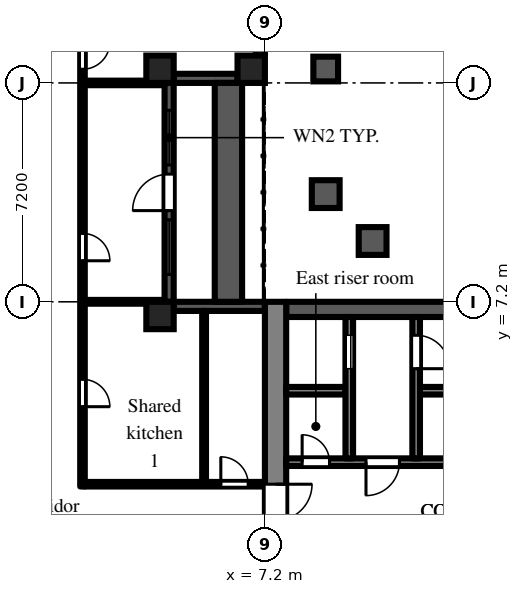
"""IFC4 building model, lengths in metres.
Left out: names, types, materials, properties, quantities, classifications, styles, units other than length and angle.
Written with IfcOpenShell. Run it as: python <this file> out.ifc"""

import sys

from ifc_helpers import new_model, si_unit, direction, frame, frame_2d, origin, origin_2d, place, context, subcontext, project, spatial, rectangle, extrude, element, fill, save


model = new_model("IFC4")
c1 = context("Model", 3, precision=1e-05, world=origin(), true_north=direction((0.0, 1.0)))
c2 = subcontext(c1, "Body", "Model", "MODEL_VIEW")
j1 = project(units=[si_unit("LENGTHUNIT", "METRE"), si_unit("PLANEANGLEUNIT", "RADIAN")], contexts=[c1])
p1 = place(None, origin())
s1 = spatial("IfcSite", under=j1, at=p1, CompositionType="ELEMENT")
p2 = place(p1, origin())
s2 = spatial("IfcBuilding", under=s1, at=p2, CompositionType="ELEMENT")
p3 = place(p2, frame((0.0, 0.0, 59.7)))
s3 = spatial("IfcBuildingStorey", under=s2, at=p3, CompositionType="ELEMENT", Elevation=59.7)
for number, where, z_axis, x_axis in (
    (1, (3.75, 6.75, 0.0), (0.0, 0.0, 1.0), (1.0, 0.0, 0.0)),
    (2, (3.75, 14.85, 0.0), (0.0, 0.0, 1.0), (1.0, 0.0, 0.0)),
    (3, (6.75, 14.85, 0.0), (0.0, 0.0, 1.0), (1.0, 0.0, 0.0)),
):
    element("IfcColumn", number, at=place(p3, frame(where, z_axis=z_axis, x_axis=x_axis)), inside=s3, PredefinedType="COLUMN", context=c2, shape_type="SweptSolid", body=[
        extrude(rectangle(XDim=0.9, YDim=0.9, at=origin_2d()), origin(), (0.0, 0.0, 1.0), 3.0),
    ])
p4 = place(p3, frame((7.2, 7.05, 0.0), z_axis=(0.0, 0.0, 1.0), x_axis=(-1.0, 0.0, 0.0)))
e4 = element("IfcWall", 4, at=p4, inside=s3, PredefinedType="SOLIDWALL", context=c2, shape_type="SweptSolid", body=[
    extrude(rectangle(XDim=3.0, YDim=0.3, at=frame_2d((1.5, 0.0))), origin(), (0.0, 0.0, 1.0), 2.55),
])
p5 = place(p3, frame((4.05, 7.2, 0.0), z_axis=(0.0, 0.0, 1.0), x_axis=(0.0, 1.0, 0.0)))
e5 = element("IfcWall", 5, at=p5, inside=s3, PredefinedType="SOLIDWALL", context=c2, shape_type="SweptSolid", body=[
    extrude(rectangle(XDim=7.2, YDim=0.3, at=frame_2d((3.6, 0.0))), origin(), (0.0, 0.0, 1.0), 2.55),
])
p6 = place(p5, frame((3.0, 0.0, 0.0)))
e6 = element("IfcOpeningElement", 6, at=p6, cuts=e5, PredefinedType="OPENING", context=c2, shape_type="SweptSolid", body=[
    extrude(rectangle(XDim=1.2, YDim=2.05, at=frame_2d((0.6, 1.025))), frame((0.0, 0.16, 0.0), z_axis=(0.0, -1.0, 0.0), x_axis=(1.0, 0.0, 0.0)), (0.0, 0.0, 1.0), 0.32),
])
p7 = place(p5, frame((0.9, 0.0, 0.2)))
e7 = element("IfcOpeningElement", 7, at=p7, cuts=e5, PredefinedType="OPENING", context=c2, shape_type="SweptSolid", body=[
    extrude(rectangle(XDim=1.8, YDim=1.85, at=frame_2d((0.9, 0.925))), frame((0.0, 0.16, 0.0), z_axis=(0.0, -1.0, 0.0), x_axis=(1.0, 0.0, 0.0)), (0.0, 0.0, 1.0), 0.32),
])
p8 = place(p5, frame((4.5, 0.0, 0.2)))
e8 = element("IfcOpeningElement", 8, at=p8, cuts=e5, PredefinedType="OPENING", context=c2, shape_type="SweptSolid", body=[
    extrude(rectangle(XDim=1.8, YDim=1.85, at=frame_2d((0.9, 0.925))), frame((0.0, 0.16, 0.0), z_axis=(0.0, -1.0, 0.0), x_axis=(1.0, 0.0, 0.0)), (0.0, 0.0, 1.0), 0.32),
])
p9 = place(p3, frame((4.2, 14.55, 0.0), z_axis=(0.0, 0.0, 1.0), x_axis=(1.0, 0.0, 0.0)))
e9 = element("IfcWall", 9, at=p9, inside=s3, PredefinedType="SOLIDWALL", context=c2, shape_type="SweptSolid", body=[
    extrude(rectangle(XDim=2.1, YDim=0.3, at=frame_2d((1.05, 0.0))), origin(), (0.0, 0.0, 1.0), 2.55),
])
p10 = place(p3, frame((7.05, 15.3, 0.0), z_axis=(0.0, 0.0, 1.0), x_axis=(0.0, 1.0, 0.0)))
e10 = element("IfcWall", 10, at=p10, inside=s3, PredefinedType="SOLIDWALL", context=c2, shape_type="SweptSolid", body=[
    extrude(rectangle(XDim=1.8, YDim=0.3, at=frame_2d((0.9, 0.0))), origin(), (0.0, 0.0, 1.0), 2.1),
])
p11 = place(p3, frame((6.0, 7.2, 0.0), z_axis=(0.0, 0.0, 1.0), x_axis=(0.0, 1.0, 0.0)))
e11 = element("IfcWall", 11, at=p11, inside=s3, PredefinedType="PARAPET", context=c2, shape_type="SweptSolid", body=[
    extrude(rectangle(XDim=7.2, YDim=0.9, at=frame_2d((3.6, 0.0))), origin(), (0.0, 0.0, 1.0), 0.8),
])
p12 = place(p3, frame((7.55, -7.2, 0.0), z_axis=(0.0, 0.0, 1.0), x_axis=(0.0, 1.0, 0.0)))
e12 = element("IfcWall", 12, at=p12, inside=s3, PredefinedType="SHEAR", context=c2, shape_type="SweptSolid", body=[
    extrude(rectangle(XDim=14.4, YDim=0.7, at=frame_2d((7.2, 0.0))), origin(), (0.0, 0.0, 1.0), 2.55),
])
p13 = place(p12, frame((6.0, 0.0, 0.0)))
e13 = element("IfcOpeningElement", 13, at=p13, cuts=e12, PredefinedType="OPENING", context=c2, shape_type="SweptSolid", body=[
    extrude(rectangle(XDim=2.4, YDim=2.2, at=frame_2d((1.2, 1.1))), frame((0.0, 0.36, 0.0), z_axis=(0.0, -1.0, 0.0), x_axis=(1.0, 0.0, 0.0)), (0.0, 0.0, 1.0), 0.72),
])
p14 = place(p3, frame((7.9, 6.95, 0.0), z_axis=(0.0, 0.0, 1.0), x_axis=(1.0, 0.0, 0.0)))
e14 = element("IfcWall", 14, at=p14, inside=s3, PredefinedType="SHEAR", context=c2, shape_type="SweptSolid", body=[
    extrude(rectangle(XDim=12.95, YDim=0.5, at=frame_2d((6.475, 0.0))), origin(), (0.0, 0.0, 1.0), 2.55),
])
p15 = place(p3, frame((7.9, 1.925, 0.0), z_axis=(0.0, 0.0, 1.0), x_axis=(1.0, 0.0, 0.0)))
e15 = element("IfcWall", 15, at=p15, inside=s3, PredefinedType="SHEAR", context=c2, shape_type="SweptSolid", body=[
    extrude(rectangle(XDim=12.95, YDim=0.25, at=frame_2d((6.475, 0.0))), origin(), (0.0, 0.0, 1.0), 2.55),
])
p16 = place(p15, frame((0.525, 0.0, 0.0)))
e16 = element("IfcOpeningElement", 16, at=p16, cuts=e15, PredefinedType="OPENING", context=c2, shape_type="SweptSolid", body=[
    extrude(rectangle(XDim=0.9, YDim=2.1, at=frame_2d((0.45, 1.05))), frame((0.0, 0.135, 0.0), z_axis=(0.0, -1.0, 0.0), x_axis=(1.0, 0.0, 0.0)), (0.0, 0.0, 1.0), 0.27),
])
p17 = place(p15, frame((2.625, 0.0, 0.0)))
e17 = element("IfcOpeningElement", 17, at=p17, cuts=e15, PredefinedType="OPENING", context=c2, shape_type="SweptSolid", body=[
    extrude(rectangle(XDim=1.1, YDim=2.1, at=frame_2d((0.55, 1.05))), frame((0.0, 0.135, 0.0), z_axis=(0.0, -1.0, 0.0), x_axis=(1.0, 0.0, 0.0)), (0.0, 0.0, 1.0), 0.27),
])
p18 = place(p15, frame((6.025, 0.0, 0.0)))
e18 = element("IfcOpeningElement", 18, at=p18, cuts=e15, PredefinedType="OPENING", context=c2, shape_type="SweptSolid", body=[
    extrude(rectangle(XDim=0.9, YDim=2.1, at=frame_2d((0.45, 1.05))), frame((0.0, 0.135, 0.0), z_axis=(0.0, -1.0, 0.0), x_axis=(1.0, 0.0, 0.0)), (0.0, 0.0, 1.0), 0.27),
])
p19 = place(p15, frame((9.325, 0.0, 0.0)))
e19 = element("IfcOpeningElement", 19, at=p19, cuts=e15, PredefinedType="OPENING", context=c2, shape_type="SweptSolid", body=[
    extrude(rectangle(XDim=0.9, YDim=2.1, at=frame_2d((0.45, 1.05))), frame((0.0, 0.135, 0.0), z_axis=(0.0, -1.0, 0.0), x_axis=(1.0, 0.0, 0.0)), (0.0, 0.0, 1.0), 0.27),
])
p20 = place(p3, frame((7.9, 4.275, 0.0), z_axis=(0.0, 0.0, 1.0), x_axis=(1.0, 0.0, 0.0)))
e20 = element("IfcWall", 20, at=p20, inside=s3, PredefinedType="SHEAR", context=c2, shape_type="SweptSolid", body=[
    extrude(rectangle(XDim=1.95, YDim=0.25, at=frame_2d((0.975, 0.0))), origin(), (0.0, 0.0, 1.0), 2.55),
])
p21 = place(p3, frame((12.3, 4.275, 0.0), z_axis=(0.0, 0.0, 1.0), x_axis=(1.0, 0.0, 0.0)))
e21 = element("IfcWall", 21, at=p21, inside=s3, PredefinedType="SHEAR", context=c2, shape_type="SweptSolid", body=[
    extrude(rectangle(XDim=8.55, YDim=0.25, at=frame_2d((4.275, 0.0))), origin(), (0.0, 0.0, 1.0), 2.55),
])
p22 = place(p3, frame((9.975, 2.05, 0.0), z_axis=(0.0, 0.0, 1.0), x_axis=(0.0, 1.0, 0.0)))
e22 = element("IfcWall", 22, at=p22, inside=s3, PredefinedType="SHEAR", context=c2, shape_type="SweptSolid", body=[
    extrude(rectangle(XDim=4.65, YDim=0.25, at=frame_2d((2.325, 0.0))), origin(), (0.0, 0.0, 1.0), 2.55),
])
p23 = place(p22, frame((2.95, 0.0, 0.0)))
e23 = element("IfcOpeningElement", 23, at=p23, cuts=e22, PredefinedType="OPENING", context=c2, shape_type="SweptSolid", body=[
    extrude(rectangle(XDim=1.1, YDim=2.1, at=frame_2d((0.55, 1.05))), frame((0.0, 0.135, 0.0), z_axis=(0.0, -1.0, 0.0), x_axis=(1.0, 0.0, 0.0)), (0.0, 0.0, 1.0), 0.27),
])
p24 = place(p3, frame((12.175, 2.05, 0.0), z_axis=(0.0, 0.0, 1.0), x_axis=(0.0, 1.0, 0.0)))
e24 = element("IfcWall", 24, at=p24, inside=s3, PredefinedType="SHEAR", context=c2, shape_type="SweptSolid", body=[
    extrude(rectangle(XDim=4.65, YDim=0.25, at=frame_2d((2.325, 0.0))), origin(), (0.0, 0.0, 1.0), 2.55),
])
p25 = place(p24, frame((2.95, 0.0, 0.0)))
e25 = element("IfcOpeningElement", 25, at=p25, cuts=e24, PredefinedType="OPENING", context=c2, shape_type="SweptSolid", body=[
    extrude(rectangle(XDim=1.1, YDim=2.1, at=frame_2d((0.55, 1.05))), frame((0.0, 0.135, 0.0), z_axis=(0.0, -1.0, 0.0), x_axis=(1.0, 0.0, 0.0)), (0.0, 0.0, 1.0), 0.27),
])
p26 = place(p3, frame((1.2, 1.125, 0.0), z_axis=(0.0, 0.0, 1.0), x_axis=(0.0, 1.0, 0.0)))
e26 = element("IfcWall", 26, at=p26, inside=s3, PredefinedType="PARTITIONING", context=c2, shape_type="SweptSolid", body=[
    extrude(rectangle(XDim=35.375, YDim=0.15, at=frame_2d((17.688, 0.0))), origin(), (0.0, 0.0, 1.0), 2.55),
])
p27 = place(p26, frame((2.625, 0.0, 0.0)))
e27 = element("IfcOpeningElement", 27, at=p27, cuts=e26, PredefinedType="OPENING", context=c2, shape_type="SweptSolid", body=[
    extrude(rectangle(XDim=0.9, YDim=2.1, at=frame_2d((0.45, 1.05))), frame((0.0, 0.085, 0.0), z_axis=(0.0, -1.0, 0.0), x_axis=(1.0, 0.0, 0.0)), (0.0, 0.0, 1.0), 0.17),
])
p28 = place(p26, frame((7.425, 0.0, 0.0)))
e28 = element("IfcOpeningElement", 28, at=p28, cuts=e26, PredefinedType="OPENING", context=c2, shape_type="SweptSolid", body=[
    extrude(rectangle(XDim=0.9, YDim=2.1, at=frame_2d((0.45, 1.05))), frame((0.0, 0.085, 0.0), z_axis=(0.0, -1.0, 0.0), x_axis=(1.0, 0.0, 0.0)), (0.0, 0.0, 1.0), 0.17),
])
p29 = place(p26, frame((13.725, 0.0, 0.0)))
e29 = element("IfcOpeningElement", 29, at=p29, cuts=e26, PredefinedType="OPENING", context=c2, shape_type="SweptSolid", body=[
    extrude(rectangle(XDim=0.9, YDim=2.1, at=frame_2d((0.45, 1.05))), frame((0.0, 0.085, 0.0), z_axis=(0.0, -1.0, 0.0), x_axis=(1.0, 0.0, 0.0)), (0.0, 0.0, 1.0), 0.17),
])
p30 = place(p26, frame((15.525, 0.0, 0.0)))
e30 = element("IfcOpeningElement", 30, at=p30, cuts=e26, PredefinedType="OPENING", context=c2, shape_type="SweptSolid", body=[
    extrude(rectangle(XDim=0.9, YDim=2.1, at=frame_2d((0.45, 1.05))), frame((0.0, 0.085, 0.0), z_axis=(0.0, -1.0, 0.0), x_axis=(1.0, 0.0, 0.0)), (0.0, 0.0, 1.0), 0.17),
])
p31 = place(p26, frame((32.825, 0.0, 0.0)))
e31 = element("IfcOpeningElement", 31, at=p31, cuts=e26, PredefinedType="OPENING", context=c2, shape_type="SweptSolid", body=[
    extrude(rectangle(XDim=1.0, YDim=2.1, at=frame_2d((0.5, 1.05))), frame((0.0, 0.085, 0.0), z_axis=(0.0, -1.0, 0.0), x_axis=(1.0, 0.0, 0.0)), (0.0, 0.0, 1.0), 0.17),
])
p32 = place(p3, frame((1.275, 1.2, 0.0), z_axis=(0.0, 0.0, 1.0), x_axis=(1.0, 0.0, 0.0)))
e32 = element("IfcWall", 32, at=p32, inside=s3, PredefinedType="PARTITIONING", context=c2, shape_type="SweptSolid", body=[
    extrude(rectangle(XDim=5.925, YDim=0.15, at=frame_2d((2.962, 0.0))), origin(), (0.0, 0.0, 1.0), 2.55),
])
p33 = place(p32, frame((4.475, 0.0, 0.0)))
e33 = element("IfcOpeningElement", 33, at=p33, cuts=e32, PredefinedType="OPENING", context=c2, shape_type="SweptSolid", body=[
    extrude(rectangle(XDim=0.9, YDim=2.1, at=frame_2d((0.45, 1.05))), frame((0.0, 0.085, 0.0), z_axis=(0.0, -1.0, 0.0), x_axis=(1.0, 0.0, 0.0)), (0.0, 0.0, 1.0), 0.17),
])
p34 = place(p3, frame((1.275, 7.2, 0.0), z_axis=(0.0, 0.0, 1.0), x_axis=(1.0, 0.0, 0.0)))
e34 = element("IfcWall", 34, at=p34, inside=s3, PredefinedType="PARTITIONING", context=c2, shape_type="SweptSolid", body=[
    extrude(rectangle(XDim=2.625, YDim=0.125, at=frame_2d((1.312, 0.0))), origin(), (0.0, 0.0, 1.0), 2.55),
])
p35 = place(p3, frame((1.275, 14.4, 0.0), z_axis=(0.0, 0.0, 1.0), x_axis=(1.0, 0.0, 0.0)))
e35 = element("IfcWall", 35, at=p35, inside=s3, PredefinedType="PARTITIONING", context=c2, shape_type="SweptSolid", body=[
    extrude(rectangle(XDim=2.625, YDim=0.15, at=frame_2d((1.312, 0.0))), origin(), (0.0, 0.0, 1.0), 2.55),
])
p36 = place(p3, frame((5.2, 1.275, 0.0), z_axis=(0.0, 0.0, 1.0), x_axis=(0.0, 1.0, 0.0)))
e36 = element("IfcWall", 36, at=p36, inside=s3, PredefinedType="PARTITIONING", context=c2, shape_type="SweptSolid", body=[
    extrude(rectangle(XDim=5.625, YDim=0.125, at=frame_2d((2.812, 0.0))), origin(), (0.0, 0.0, 1.0), 2.55),
])
p37 = place(p6, origin())
e37 = element("IfcDoor", 37, at=p37, inside=s3, OperationType="SINGLE_SWING_LEFT", PredefinedType="DOOR", context=c2, shape_type="SweptSolid", body=[
    extrude(rectangle(XDim=1.2, YDim=2.05, at=frame_2d((0.6, 1.025))), frame((0.0, 0.025, 0.0), z_axis=(0.0, -1.0, 0.0), x_axis=(1.0, 0.0, 0.0)), (0.0, 0.0, 1.0), 0.05),
])
fill(e6, e37)
p38 = place(p7, origin())
e38 = element("IfcWindow", 38, at=p38, inside=s3, PartitioningType="SINGLE_PANEL", PredefinedType="WINDOW", context=c2, shape_type="SweptSolid", body=[
    extrude(rectangle(XDim=1.8, YDim=1.85, at=frame_2d((0.9, 0.925))), frame((0.0, 0.03, 0.0), z_axis=(0.0, -1.0, 0.0), x_axis=(1.0, 0.0, 0.0)), (0.0, 0.0, 1.0), 0.06),
])
fill(e7, e38)
p39 = place(p8, origin())
e39 = element("IfcWindow", 39, at=p39, inside=s3, PartitioningType="SINGLE_PANEL", PredefinedType="WINDOW", context=c2, shape_type="SweptSolid", body=[
    extrude(rectangle(XDim=1.8, YDim=1.85, at=frame_2d((0.9, 0.925))), frame((0.0, 0.03, 0.0), z_axis=(0.0, -1.0, 0.0), x_axis=(1.0, 0.0, 0.0)), (0.0, 0.0, 1.0), 0.06),
])
fill(e8, e39)
p40 = place(p23, origin())
e40 = element("IfcDoor", 40, at=p40, inside=s3, OperationType="SLIDING_TO_LEFT", PredefinedType="DOOR", context=c2, shape_type="SweptSolid", body=[
    extrude(rectangle(XDim=1.1, YDim=2.1, at=frame_2d((0.55, 1.05))), frame((0.0, 0.025, 0.0), z_axis=(0.0, -1.0, 0.0), x_axis=(1.0, 0.0, 0.0)), (0.0, 0.0, 1.0), 0.05),
])
fill(e23, e40)
p41 = place(p25, frame((1.1, 0.0, 0.0), z_axis=(0.0, 0.0, 1.0), x_axis=(-1.0, 0.0, 0.0)))
e41 = element("IfcDoor", 41, at=p41, inside=s3, OperationType="SINGLE_SWING_RIGHT", PredefinedType="DOOR", context=c2, shape_type="SweptSolid", body=[
    extrude(rectangle(XDim=1.1, YDim=2.1, at=frame_2d((0.55, 1.05))), frame((0.0, 0.025, 0.0), z_axis=(0.0, -1.0, 0.0), x_axis=(1.0, 0.0, 0.0)), (0.0, 0.0, 1.0), 0.05),
])
fill(e25, e41)
p42 = place(p16, origin())
e42 = element("IfcDoor", 42, at=p42, inside=s3, OperationType="SINGLE_SWING_LEFT", PredefinedType="DOOR", context=c2, shape_type="SweptSolid", body=[
    extrude(rectangle(XDim=0.9, YDim=2.1, at=frame_2d((0.45, 1.05))), frame((0.0, 0.025, 0.0), z_axis=(0.0, -1.0, 0.0), x_axis=(1.0, 0.0, 0.0)), (0.0, 0.0, 1.0), 0.05),
])
fill(e16, e42)
p43 = place(p17, frame((1.1, 0.0, 0.0), z_axis=(0.0, 0.0, 1.0), x_axis=(-1.0, 0.0, 0.0)))
e43 = element("IfcDoor", 43, at=p43, inside=s3, OperationType="SINGLE_SWING_RIGHT", PredefinedType="DOOR", context=c2, shape_type="SweptSolid", body=[
    extrude(rectangle(XDim=1.1, YDim=2.1, at=frame_2d((0.55, 1.05))), frame((0.0, 0.025, 0.0), z_axis=(0.0, -1.0, 0.0), x_axis=(1.0, 0.0, 0.0)), (0.0, 0.0, 1.0), 0.05),
])
fill(e17, e43)
p44 = place(p13, frame((2.4, 0.0, 0.0), z_axis=(0.0, 0.0, 1.0), x_axis=(-1.0, 0.0, 0.0)))
e44 = element("IfcDoor", 44, at=p44, inside=s3, OperationType="DOUBLE_DOOR_DOUBLE_SWING", PredefinedType="DOOR", context=c2, shape_type="SweptSolid", body=[
    extrude(rectangle(XDim=2.4, YDim=2.2, at=frame_2d((1.2, 1.1))), frame((0.0, 0.025, 0.0), z_axis=(0.0, -1.0, 0.0), x_axis=(1.0, 0.0, 0.0)), (0.0, 0.0, 1.0), 0.05),
])
fill(e13, e44)
p45 = place(p27, frame((0.9, 0.0, 0.0), z_axis=(0.0, 0.0, 1.0), x_axis=(-1.0, 0.0, 0.0)))
e45 = element("IfcDoor", 45, at=p45, inside=s3, OperationType="SINGLE_SWING_RIGHT", PredefinedType="DOOR", context=c2, shape_type="SweptSolid", body=[
    extrude(rectangle(XDim=0.9, YDim=2.1, at=frame_2d((0.45, 1.05))), frame((0.0, 0.025, 0.0), z_axis=(0.0, -1.0, 0.0), x_axis=(1.0, 0.0, 0.0)), (0.0, 0.0, 1.0), 0.05),
])
fill(e27, e45)
p46 = place(p33, origin())
e46 = element("IfcDoor", 46, at=p46, inside=s3, OperationType="SINGLE_SWING_LEFT", PredefinedType="DOOR", context=c2, shape_type="SweptSolid", body=[
    extrude(rectangle(XDim=0.9, YDim=2.1, at=frame_2d((0.45, 1.05))), frame((0.0, 0.025, 0.0), z_axis=(0.0, -1.0, 0.0), x_axis=(1.0, 0.0, 0.0)), (0.0, 0.0, 1.0), 0.05),
])
fill(e33, e46)
p47 = place(p28, frame((0.9, 0.0, 0.0), z_axis=(0.0, 0.0, 1.0), x_axis=(-1.0, 0.0, 0.0)))
e47 = element("IfcDoor", 47, at=p47, inside=s3, OperationType="SINGLE_SWING_RIGHT", PredefinedType="DOOR", context=c2, shape_type="SweptSolid", body=[
    extrude(rectangle(XDim=0.9, YDim=2.1, at=frame_2d((0.45, 1.05))), frame((0.0, 0.025, 0.0), z_axis=(0.0, -1.0, 0.0), x_axis=(1.0, 0.0, 0.0)), (0.0, 0.0, 1.0), 0.05),
])
fill(e28, e47)
p48 = place(p29, frame((0.9, 0.0, 0.0), z_axis=(0.0, 0.0, 1.0), x_axis=(-1.0, 0.0, 0.0)))
e48 = element("IfcDoor", 48, at=p48, inside=s3, OperationType="SINGLE_SWING_LEFT", PredefinedType="DOOR", context=c2, shape_type="SweptSolid", body=[
    extrude(rectangle(XDim=0.9, YDim=2.1, at=frame_2d((0.45, 1.05))), frame((0.0, 0.025, 0.0), z_axis=(0.0, -1.0, 0.0), x_axis=(1.0, 0.0, 0.0)), (0.0, 0.0, 1.0), 0.05),
])
fill(e29, e48)
save(model, sys.argv[1])
